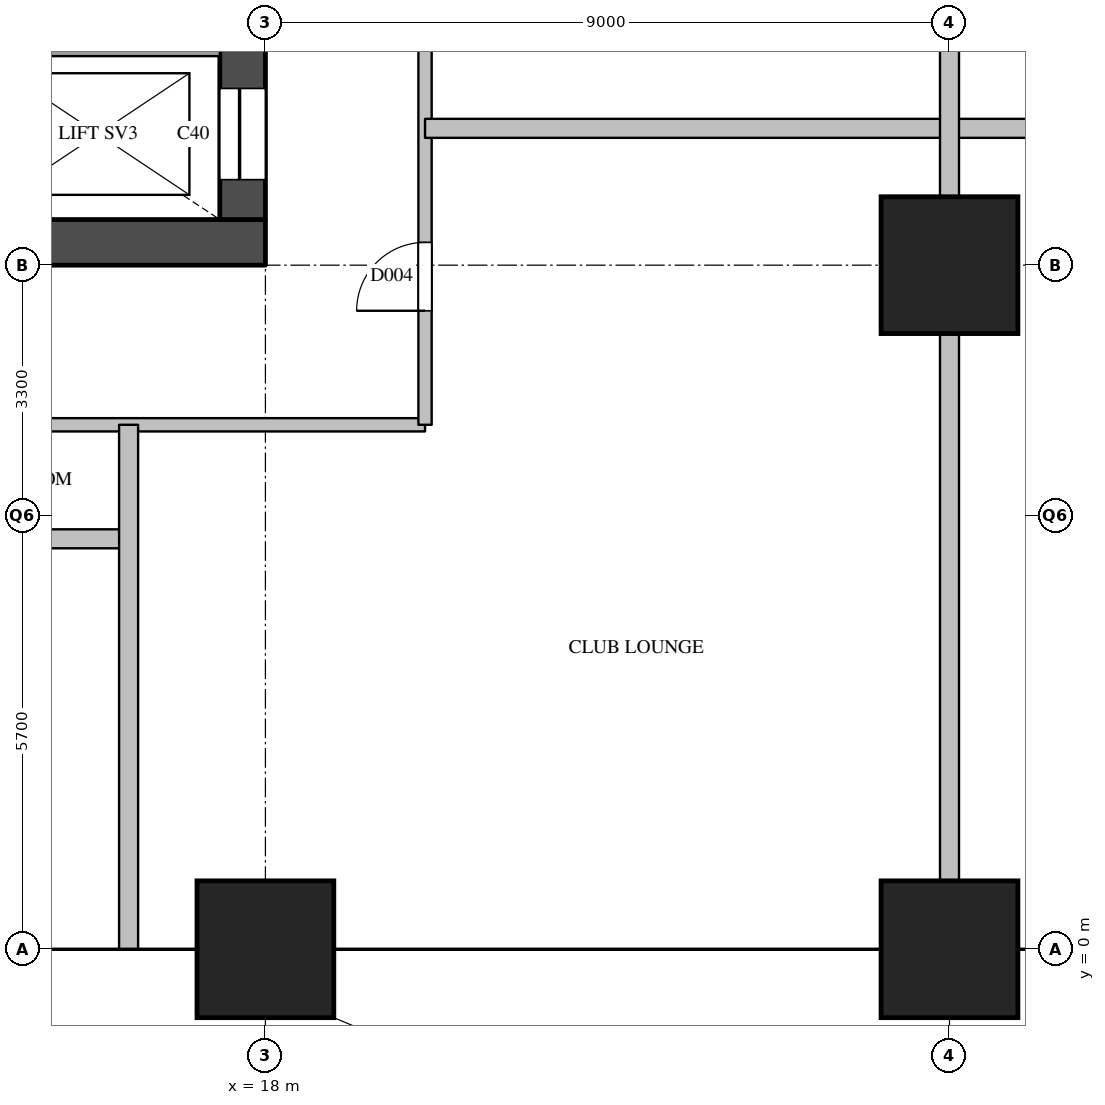
"""IFC4 building model, lengths in metres.
Left out: names, types, materials, properties, quantities, classifications, styles, units other than length and angle.
Written with IfcOpenShell. Run it as: python <this file> out.ifc"""

import sys

from ifc_helpers import new_model, si_unit, direction, frame, frame_2d, origin, origin_2d, place, context, subcontext, project, spatial, rectangle, extrude, element, fill, save


model = new_model("IFC4")
c1 = context("Model", 3, precision=1e-05, world=origin(), true_north=direction((0.0, 1.0)))
c2 = subcontext(c1, "Body", "Model", "MODEL_VIEW")
j1 = project(units=[si_unit("LENGTHUNIT", "METRE"), si_unit("PLANEANGLEUNIT", "RADIAN")], contexts=[c1])
p1 = place(None, origin())
s1 = spatial("IfcSite", under=j1, at=p1, CompositionType="ELEMENT")
p2 = place(p1, origin())
s2 = spatial("IfcBuilding", under=s1, at=p2, CompositionType="ELEMENT")
p3 = place(p2, frame((0.0, 0.0, 53.8)))
s3 = spatial("IfcBuildingStorey", under=s2, at=p3, CompositionType="ELEMENT", Elevation=53.8)
for number, where, z_axis, x_axis in (
    (1, (18.0, 0.0, 0.0), (0.0, 0.0, 1.0), (1.0, 0.0, 0.0)),
    (2, (27.0, 0.0, 0.0), (0.0, 0.0, 1.0), (1.0, 0.0, 0.0)),
    (3, (27.0, 9.0, 0.0), (0.0, 0.0, 1.0), (1.0, 0.0, 0.0)),
):
    element("IfcColumn", number, at=place(p3, frame(where, z_axis=z_axis, x_axis=x_axis)), inside=s3, PredefinedType="COLUMN", context=c2, shape_type="SweptSolid", body=[
        extrude(rectangle(XDim=1.8, YDim=1.8, at=origin_2d()), origin(), (0.0, 0.0, 1.0), 3.8),
    ])
p4 = place(p3, frame((9.0, 9.3, 0.0), z_axis=(0.0, 0.0, 1.0), x_axis=(1.0, 0.0, 0.0)))
e4 = element("IfcWall", 4, at=p4, inside=s3, PredefinedType="SHEAR", context=c2, shape_type="SweptSolid", body=[
    extrude(rectangle(XDim=9.0, YDim=0.6, at=frame_2d((4.5, 0.0))), origin(), (0.0, 0.0, 1.0), 3.5),
])
p5 = place(p3, frame((17.7, 9.6, 0.0), z_axis=(0.0, 0.0, 1.0), x_axis=(0.0, 1.0, 0.0)))
e5 = element("IfcWall", 5, at=p5, inside=s3, PredefinedType="SHEAR", context=c2, shape_type="SweptSolid", body=[
    extrude(rectangle(XDim=12.3, YDim=0.6, at=frame_2d((6.15, 0.0))), origin(), (0.0, 0.0, 1.0), 3.5),
])
p6 = place(p5, frame((0.525, 0.0, 0.0)))
e6 = element("IfcOpeningElement", 6, at=p6, cuts=e5, PredefinedType="OPENING", context=c2, shape_type="SweptSolid", body=[
    extrude(rectangle(XDim=1.2, YDim=2.1, at=frame_2d((0.6, 1.05))), frame((0.0, 0.31, 0.0), z_axis=(0.0, -1.0, 0.0), x_axis=(1.0, 0.0, 0.0)), (0.0, 0.0, 1.0), 0.62),
])
p7 = place(p3, frame((9.6, 11.85, 0.0), z_axis=(0.0, 0.0, 1.0), x_axis=(1.0, 0.0, 0.0)))
e7 = element("IfcWall", 7, at=p7, inside=s3, PredefinedType="SOLIDWALL", context=c2, shape_type="SweptSolid", body=[
    extrude(rectangle(XDim=7.8, YDim=0.2, at=frame_2d((3.9, 0.0))), origin(), (0.0, 0.0, 1.0), 3.5),
])
p8 = place(p3, frame((6.9, 6.9, 0.0), z_axis=(0.0, 0.0, 1.0), x_axis=(1.0, 0.0, 0.0)))
e8 = element("IfcWall", 8, at=p8, inside=s3, PredefinedType="PARTITIONING", context=c2, shape_type="SweptSolid", body=[
    extrude(rectangle(XDim=13.2, YDim=0.175, at=frame_2d((6.6, 0.0))), origin(), (0.0, 0.0, 1.0), 3.5),
])
p9 = place(p8, frame((6.1, 0.0, 0.0)))
e9 = element("IfcOpeningElement", 9, at=p9, cuts=e8, PredefinedType="OPENING", context=c2, shape_type="SweptSolid", body=[
    extrude(rectangle(XDim=1.0, YDim=2.1, at=frame_2d((0.5, 1.05))), frame((0.0, 0.097, 0.0), z_axis=(0.0, -1.0, 0.0), x_axis=(1.0, 0.0, 0.0)), (0.0, 0.0, 1.0), 0.195),
])
p10 = place(p3, frame((20.1, 6.9, 0.0), z_axis=(0.0, 0.0, 1.0), x_axis=(0.0, 1.0, 0.0)))
e10 = element("IfcWall", 10, at=p10, inside=s3, PredefinedType="PARTITIONING", context=c2, shape_type="SweptSolid", body=[
    extrude(rectangle(XDim=7.65, YDim=0.175, at=frame_2d((3.825, 0.0))), origin(), (0.0, 0.0, 1.0), 3.5),
])
p11 = place(p10, frame((1.5, 0.0, 0.0)))
e11 = element("IfcOpeningElement", 11, at=p11, cuts=e10, PredefinedType="OPENING", context=c2, shape_type="SweptSolid", body=[
    extrude(rectangle(XDim=0.9, YDim=2.1, at=frame_2d((0.45, 1.05))), frame((0.0, 0.097, 0.0), z_axis=(0.0, -1.0, 0.0), x_axis=(1.0, 0.0, 0.0)), (0.0, 0.0, 1.0), 0.195),
])
p12 = place(p3, frame((10.675, 5.4, 0.0), z_axis=(0.0, 0.0, 1.0), x_axis=(1.0, 0.0, 0.0)))
e12 = element("IfcWall", 12, at=p12, inside=s3, PredefinedType="PARTITIONING", context=c2, shape_type="SweptSolid", body=[
    extrude(rectangle(XDim=5.525, YDim=0.25, at=frame_2d((2.762, 0.0))), origin(), (0.0, 0.0, 1.0), 3.5),
])
p13 = place(p3, frame((20.1, 10.8, 0.0), z_axis=(0.0, 0.0, 1.0), x_axis=(1.0, 0.0, 0.0)))
e13 = element("IfcWall", 13, at=p13, inside=s3, PredefinedType="PARTITIONING", context=c2, shape_type="SweptSolid", body=[
    extrude(rectangle(XDim=13.8, YDim=0.25, at=frame_2d((6.9, 0.0))), origin(), (0.0, 0.0, 1.0), 2.5),
])
p14 = place(p3, frame((16.2, 0.0, 0.0), z_axis=(0.0, 0.0, 1.0), x_axis=(0.0, 1.0, 0.0)))
e14 = element("IfcWall", 14, at=p14, inside=s3, PredefinedType="PARTITIONING", context=c2, shape_type="SweptSolid", body=[
    extrude(rectangle(XDim=6.9, YDim=0.25, at=frame_2d((3.45, 0.0))), origin(), (0.0, 0.0, 1.0), 2.5),
])
p15 = place(p3, frame((27.0, 0.0, 0.0), z_axis=(0.0, 0.0, 1.0), x_axis=(0.0, 1.0, 0.0)))
e15 = element("IfcWall", 15, at=p15, inside=s3, PredefinedType="PARTITIONING", context=c2, shape_type="SweptSolid", body=[
    extrude(rectangle(XDim=14.55, YDim=0.25, at=frame_2d((7.275, 0.0))), origin(), (0.0, 0.0, 1.0), 2.5),
])
p16 = place(p6, origin())
e16 = element("IfcDoor", 16, at=p16, inside=s3, OperationType="SLIDING_TO_LEFT", PredefinedType="DOOR", context=c2, shape_type="SweptSolid", body=[
    extrude(rectangle(XDim=1.2, YDim=2.1, at=frame_2d((0.6, 1.05))), frame((0.0, 0.025, 0.0), z_axis=(0.0, -1.0, 0.0), x_axis=(1.0, 0.0, 0.0)), (0.0, 0.0, 1.0), 0.05),
])
fill(e6, e16)
p17 = place(p11, origin())
e17 = element("IfcDoor", 17, at=p17, inside=s3, OperationType="SINGLE_SWING_LEFT", PredefinedType="DOOR", context=c2, shape_type="SweptSolid", body=[
    extrude(rectangle(XDim=0.9, YDim=2.1, at=frame_2d((0.45, 1.05))), frame((0.0, 0.025, 0.0), z_axis=(0.0, -1.0, 0.0), x_axis=(1.0, 0.0, 0.0)), (0.0, 0.0, 1.0), 0.05),
])
fill(e11, e17)
save(model, sys.argv[1])
